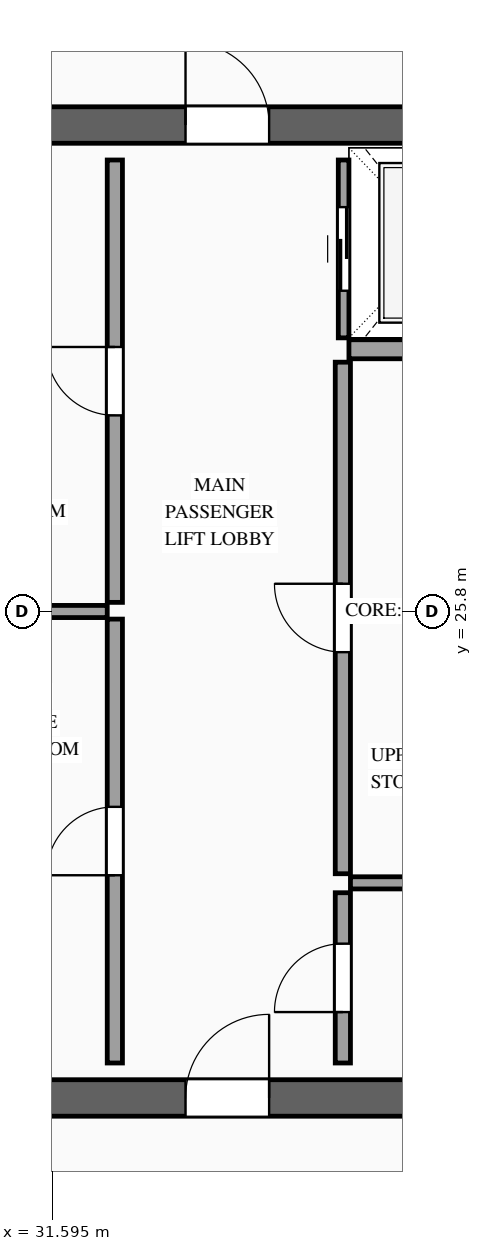
"""IFC4 building model, lengths in metres.
Left out: names, types, materials, properties, quantities, classifications, styles, units other than length and angle.
Written with IfcOpenShell. Run it as: python <this file> out.ifc"""

import sys

from ifc_helpers import new_model, si_unit, direction, frame, frame_2d, origin, place, context, subcontext, project, spatial, rectangle, extrude, source, transform, mapped, element, fill, save


model = new_model("IFC4")
c1 = context("Model", 3, precision=1e-05, world=origin(), true_north=direction((0.0, 1.0)))
c2 = subcontext(c1, "Body", "Model", "MODEL_VIEW")
j1 = project(units=[si_unit("LENGTHUNIT", "METRE"), si_unit("PLANEANGLEUNIT", "RADIAN")], contexts=[c1])
p1 = place(None, origin())
s1 = spatial("IfcSite", under=j1, at=p1, CompositionType="ELEMENT")
p2 = place(p1, origin())
s2 = spatial("IfcBuilding", under=s1, at=p2, CompositionType="ELEMENT")
p3 = place(p2, frame((0.0, 0.0, 299.6)))
s3 = spatial("IfcBuildingStorey", under=s2, at=p3, CompositionType="ELEMENT", Elevation=299.6)
p4 = place(p3, frame((23.56, 19.4, 0.0), z_axis=(0.0, 0.0, 1.0), x_axis=(1.0, 0.0, 0.0)))
e1 = element("IfcWall", 1, at=p4, inside=s3, PredefinedType="SHEAR", context=c2, shape_type="SweptSolid", body=[
    extrude(rectangle(XDim=26.88, YDim=0.48, at=frame_2d((13.44, 0.0))), origin(), (0.0, 0.0, 1.0), 3.5),
])
p5 = place(p4, frame((1.89, 0.0, 0.0)))
e2 = element("IfcOpeningElement", 2, at=p5, cuts=e1, PredefinedType="OPENING", context=c2, shape_type="SweptSolid", body=[
    extrude(rectangle(XDim=1.1, YDim=2.2, at=frame_2d((0.55, 1.1))), frame((0.0, 0.255, 0.0), z_axis=(0.0, -1.0, 0.0), x_axis=(1.0, 0.0, 0.0)), (0.0, 0.0, 1.0), 0.51),
])
p6 = place(p4, frame((9.79, 0.0, 0.0)))
e3 = element("IfcOpeningElement", 3, at=p6, cuts=e1, PredefinedType="OPENING", context=c2, shape_type="SweptSolid", body=[
    extrude(rectangle(XDim=1.1, YDim=2.2, at=frame_2d((0.55, 1.1))), frame((0.0, 0.255, 0.0), z_axis=(0.0, -1.0, 0.0), x_axis=(1.0, 0.0, 0.0)), (0.0, 0.0, 1.0), 0.51),
])
p7 = place(p4, frame((22.99, 0.0, 0.0)))
e4 = element("IfcOpeningElement", 4, at=p7, cuts=e1, PredefinedType="OPENING", context=c2, shape_type="SweptSolid", body=[
    extrude(rectangle(XDim=1.1, YDim=2.2, at=frame_2d((0.55, 1.1))), frame((0.0, 0.255, 0.0), z_axis=(0.0, -1.0, 0.0), x_axis=(1.0, 0.0, 0.0)), (0.0, 0.0, 1.0), 0.51),
])
p8 = place(p4, frame((19.61, 0.0, 0.0)))
e5 = element("IfcOpeningElement", 5, at=p8, cuts=e1, PredefinedType="OPENING", context=c2, shape_type="SweptSolid", body=[
    extrude(rectangle(XDim=0.9, YDim=2.15, at=frame_2d((0.45, 1.075))), frame((0.0, 0.255, 0.0), z_axis=(0.0, -1.0, 0.0), x_axis=(1.0, 0.0, 0.0)), (0.0, 0.0, 1.0), 0.51),
])
p9 = place(p4, frame((18.17, 0.0, 0.0)))
e6 = element("IfcOpeningElement", 6, at=p9, cuts=e1, PredefinedType="OPENING", context=c2, shape_type="SweptSolid", body=[
    extrude(rectangle(XDim=0.9, YDim=2.15, at=frame_2d((0.45, 1.075))), frame((0.0, 0.255, 0.0), z_axis=(0.0, -1.0, 0.0), x_axis=(1.0, 0.0, 0.0)), (0.0, 0.0, 1.0), 0.51),
])
p10 = place(p3, frame((23.56, 32.2, 0.0), z_axis=(0.0, 0.0, 1.0), x_axis=(1.0, 0.0, 0.0)))
e7 = element("IfcWall", 7, at=p10, inside=s3, PredefinedType="SHEAR", context=c2, shape_type="SweptSolid", body=[
    extrude(rectangle(XDim=26.88, YDim=0.48, at=frame_2d((13.44, 0.0))), origin(), (0.0, 0.0, 1.0), 3.5),
])
p11 = place(p10, frame((4.51, 0.0, 0.0)))
e8 = element("IfcOpeningElement", 8, at=p11, cuts=e7, PredefinedType="OPENING", context=c2, shape_type="SweptSolid", body=[
    extrude(rectangle(XDim=0.9, YDim=2.15, at=frame_2d((0.45, 1.075))), frame((0.0, 0.255, 0.0), z_axis=(0.0, -1.0, 0.0), x_axis=(1.0, 0.0, 0.0)), (0.0, 0.0, 1.0), 0.51),
])
p12 = place(p10, frame((9.79, 0.0, 0.0)))
e9 = element("IfcOpeningElement", 9, at=p12, cuts=e7, PredefinedType="OPENING", context=c2, shape_type="SweptSolid", body=[
    extrude(rectangle(XDim=1.1, YDim=2.2, at=frame_2d((0.55, 1.1))), frame((0.0, 0.255, 0.0), z_axis=(0.0, -1.0, 0.0), x_axis=(1.0, 0.0, 0.0)), (0.0, 0.0, 1.0), 0.51),
])
p13 = place(p10, frame((15.64, 0.0, 0.0)))
e10 = element("IfcOpeningElement", 10, at=p13, cuts=e7, PredefinedType="OPENING", context=c2, shape_type="SweptSolid", body=[
    extrude(rectangle(XDim=1.1, YDim=2.2, at=frame_2d((0.55, 1.1))), frame((0.0, 0.255, 0.0), z_axis=(0.0, -1.0, 0.0), x_axis=(1.0, 0.0, 0.0)), (0.0, 0.0, 1.0), 0.51),
])
p14 = place(p10, frame((18.74, 0.0, 0.0)))
e11 = element("IfcOpeningElement", 11, at=p14, cuts=e7, PredefinedType="OPENING", context=c2, shape_type="SweptSolid", body=[
    extrude(rectangle(XDim=1.1, YDim=2.2, at=frame_2d((0.55, 1.1))), frame((0.0, 0.255, 0.0), z_axis=(0.0, -1.0, 0.0), x_axis=(1.0, 0.0, 0.0)), (0.0, 0.0, 1.0), 0.51),
])
p15 = place(p3, frame((35.43, 29.4, 0.0), z_axis=(0.0, 0.0, 1.0), x_axis=(0.0, 1.0, 0.0)))
e12 = element("IfcWall", 12, at=p15, inside=s3, PredefinedType="SOLIDWALL", context=c2, shape_type="SweptSolid", body=[
    extrude(rectangle(XDim=2.34, YDim=0.14, at=frame_2d((1.17, 0.0))), origin(), (0.0, 0.0, 1.0), 3.28),
])
p16 = place(p15, frame((0.62, 0.0, 0.0)))
e13 = element("IfcOpeningElement", 13, at=p16, cuts=e12, PredefinedType="OPENING", context=c2, shape_type="SweptSolid", body=[
    extrude(rectangle(XDim=1.1, YDim=2.2, at=frame_2d((0.55, 1.1))), frame((0.0, 0.085, 0.0), z_axis=(0.0, -1.0, 0.0), x_axis=(1.0, 0.0, 0.0)), (0.0, 0.0, 1.0), 0.17),
])
m1 = source(origin(), c2, "Body", "SweptSolid", [
    extrude(rectangle(XDim=2.4, YDim=0.25, at=frame_2d((1.2, 0.0))), origin(), (0.0, 0.0, 1.0), 3.28),
])
p17 = place(p3, frame((35.5, 29.25, 0.0), z_axis=(0.0, 0.0, 1.0), x_axis=(1.0, 0.0, 0.0)))
e14 = element("IfcWall", 14, at=p17, inside=s3, PredefinedType="SOLIDWALL", context=c2, shape_type="MappedRepresentation", body=[
    mapped(m1, transform((0.0, 0.0, 0.0), scale=1.0)),
])
p18 = place(p3, frame((32.42, 19.86, 0.0), z_axis=(0.0, 0.0, 1.0), x_axis=(0.0, 1.0, 0.0)))
e15 = element("IfcWall", 15, at=p18, inside=s3, PredefinedType="PARTITIONING", context=c2, shape_type="SweptSolid", body=[
    extrude(rectangle(XDim=5.84, YDim=0.2, at=frame_2d((2.92, 0.0))), origin(), (0.0, 0.0, 1.0), 3.28),
])
p19 = place(p18, frame((2.47, 0.0, 0.0)))
e16 = element("IfcOpeningElement", 16, at=p19, cuts=e15, PredefinedType="OPENING", context=c2, shape_type="SweptSolid", body=[
    extrude(rectangle(XDim=0.9, YDim=2.15, at=frame_2d((0.45, 1.075))), frame((0.0, 0.115, 0.0), z_axis=(0.0, -1.0, 0.0), x_axis=(1.0, 0.0, 0.0)), (0.0, 0.0, 1.0), 0.23),
])
p20 = place(p3, frame((32.42, 25.92, 0.0), z_axis=(0.0, 0.0, 1.0), x_axis=(0.0, 1.0, 0.0)))
e17 = element("IfcWall", 17, at=p20, inside=s3, PredefinedType="PARTITIONING", context=c2, shape_type="SweptSolid", body=[
    extrude(rectangle(XDim=5.82, YDim=0.2, at=frame_2d((2.91, 0.0))), origin(), (0.0, 0.0, 1.0), 3.28),
])
p21 = place(p20, frame((2.46, 0.0, 0.0)))
e18 = element("IfcOpeningElement", 18, at=p21, cuts=e17, PredefinedType="OPENING", context=c2, shape_type="SweptSolid", body=[
    extrude(rectangle(XDim=0.9, YDim=2.15, at=frame_2d((0.45, 1.075))), frame((0.0, 0.115, 0.0), z_axis=(0.0, -1.0, 0.0), x_axis=(1.0, 0.0, 0.0)), (0.0, 0.0, 1.0), 0.23),
])
m2 = source(origin(), c2, "Body", "SweptSolid", [
    extrude(rectangle(XDim=2.47, YDim=0.16, at=frame_2d((1.235, 0.0))), origin(), (0.0, 0.0, 1.0), 3.28),
])
p22 = place(p3, frame((29.85, 25.8, 0.0), z_axis=(0.0, 0.0, 1.0), x_axis=(1.0, 0.0, 0.0)))
e19 = element("IfcWall", 19, at=p22, inside=s3, PredefinedType="PARTITIONING", context=c2, shape_type="MappedRepresentation", body=[
    mapped(m2, transform((0.0, 0.0, 0.0), scale=1.0)),
])
p23 = place(p3, frame((35.42, 19.86, 0.0), z_axis=(0.0, 0.0, 1.0), x_axis=(0.0, 1.0, 0.0)))
e20 = element("IfcWall", 20, at=p23, inside=s3, PredefinedType="PARTITIONING", context=c2, shape_type="SweptSolid", body=[
    extrude(rectangle(XDim=2.24, YDim=0.2, at=frame_2d((1.12, 0.0))), origin(), (0.0, 0.0, 1.0), 3.28),
])
p24 = place(p23, frame((0.67, 0.0, 0.0)))
e21 = element("IfcOpeningElement", 21, at=p24, cuts=e20, PredefinedType="OPENING", context=c2, shape_type="SweptSolid", body=[
    extrude(rectangle(XDim=0.9, YDim=2.15, at=frame_2d((0.45, 1.075))), frame((0.0, 0.115, 0.0), z_axis=(0.0, -1.0, 0.0), x_axis=(1.0, 0.0, 0.0)), (0.0, 0.0, 1.0), 0.23),
])
p25 = place(p3, frame((35.42, 22.35, 0.0), z_axis=(0.0, 0.0, 1.0), x_axis=(0.0, 1.0, 0.0)))
e22 = element("IfcWall", 22, at=p25, inside=s3, PredefinedType="PARTITIONING", context=c2, shape_type="SweptSolid", body=[
    extrude(rectangle(XDim=6.73, YDim=0.2, at=frame_2d((3.365, 0.0))), origin(), (0.0, 0.0, 1.0), 3.28),
])
p26 = place(p25, frame((2.915, 0.0, 0.0)))
e23 = element("IfcOpeningElement", 23, at=p26, cuts=e22, PredefinedType="OPENING", context=c2, shape_type="SweptSolid", body=[
    extrude(rectangle(XDim=0.9, YDim=2.15, at=frame_2d((0.45, 1.075))), frame((0.0, 0.115, 0.0), z_axis=(0.0, -1.0, 0.0), x_axis=(1.0, 0.0, 0.0)), (0.0, 0.0, 1.0), 0.23),
])
m3 = source(origin(), c2, "Body", "SweptSolid", [
    extrude(rectangle(XDim=2.36, YDim=0.16, at=frame_2d((1.18, 0.0))), origin(), (0.0, 0.0, 1.0), 3.28),
])
p27 = place(p3, frame((35.52, 22.23, 0.0), z_axis=(0.0, 0.0, 1.0), x_axis=(1.0, 0.0, 0.0)))
e24 = element("IfcWall", 24, at=p27, inside=s3, PredefinedType="PARTITIONING", context=c2, shape_type="MappedRepresentation", body=[
    mapped(m3, transform((0.0, 0.0, 0.0), scale=1.0)),
])
m4 = source(origin(), c2, "Body", "SweptSolid", [
    extrude(rectangle(XDim=1.1, YDim=2.2, at=frame_2d((0.55, 1.1))), frame((0.0, 0.025, 0.0), z_axis=(0.0, -1.0, 0.0), x_axis=(1.0, 0.0, 0.0)), (0.0, 0.0, 1.0), 0.05),
])
p28 = place(p16, origin())
e25 = element("IfcDoor", 25, at=p28, inside=s3, OperationType="SLIDING_TO_RIGHT", PredefinedType="DOOR", context=c2, shape_type="MappedRepresentation", body=[
    mapped(m4, transform((0.0, 0.0, 0.0), scale=1.0)),
])
fill(e13, e25)
m5 = source(origin(), c2, "Body", "SweptSolid", [
    extrude(rectangle(XDim=1.1, YDim=2.2, at=frame_2d((0.55, 1.1))), frame((0.0, 0.025, 0.0), z_axis=(0.0, -1.0, 0.0), x_axis=(1.0, 0.0, 0.0)), (0.0, 0.0, 1.0), 0.05),
])
p29 = place(p6, origin())
e26 = element("IfcDoor", 26, at=p29, inside=s3, OperationType="SINGLE_SWING_RIGHT", PredefinedType="DOOR", context=c2, shape_type="MappedRepresentation", body=[
    mapped(m5, transform((0.0, 0.0, 0.0), scale=1.0)),
])
fill(e3, e26)
p30 = place(p12, origin())
e27 = element("IfcDoor", 27, at=p30, inside=s3, OperationType="SINGLE_SWING_LEFT", PredefinedType="DOOR", context=c2, shape_type="MappedRepresentation", body=[
    mapped(m5, transform((0.0, 0.0, 0.0), scale=1.0)),
])
fill(e9, e27)
m6 = source(origin(), c2, "Body", "SweptSolid", [
    extrude(rectangle(XDim=0.9, YDim=2.15, at=frame_2d((0.45, 1.075))), frame((0.0, 0.025, 0.0), z_axis=(0.0, -1.0, 0.0), x_axis=(1.0, 0.0, 0.0)), (0.0, 0.0, 1.0), 0.05),
])
p31 = place(p19, origin())
e28 = element("IfcDoor", 28, at=p31, inside=s3, OperationType="SINGLE_SWING_LEFT", PredefinedType="DOOR", context=c2, shape_type="MappedRepresentation", body=[
    mapped(m6, transform((0.0, 0.0, 0.0), scale=1.0)),
])
fill(e16, e28)
p32 = place(p21, origin())
e29 = element("IfcDoor", 29, at=p32, inside=s3, OperationType="SINGLE_SWING_RIGHT", PredefinedType="DOOR", context=c2, shape_type="MappedRepresentation", body=[
    mapped(m6, transform((0.0, 0.0, 0.0), scale=1.0)),
])
fill(e18, e29)
p33 = place(p24, origin())
e30 = element("IfcDoor", 30, at=p33, inside=s3, OperationType="SINGLE_SWING_LEFT", PredefinedType="DOOR", context=c2, shape_type="MappedRepresentation", body=[
    mapped(m6, transform((0.0, 0.0, 0.0), scale=1.0)),
])
fill(e21, e30)
p34 = place(p26, origin())
e31 = element("IfcDoor", 31, at=p34, inside=s3, OperationType="SINGLE_SWING_RIGHT", PredefinedType="DOOR", context=c2, shape_type="MappedRepresentation", body=[
    mapped(m6, transform((0.0, 0.0, 0.0), scale=1.0)),
])
fill(e23, e31)
save(model, sys.argv[1])
